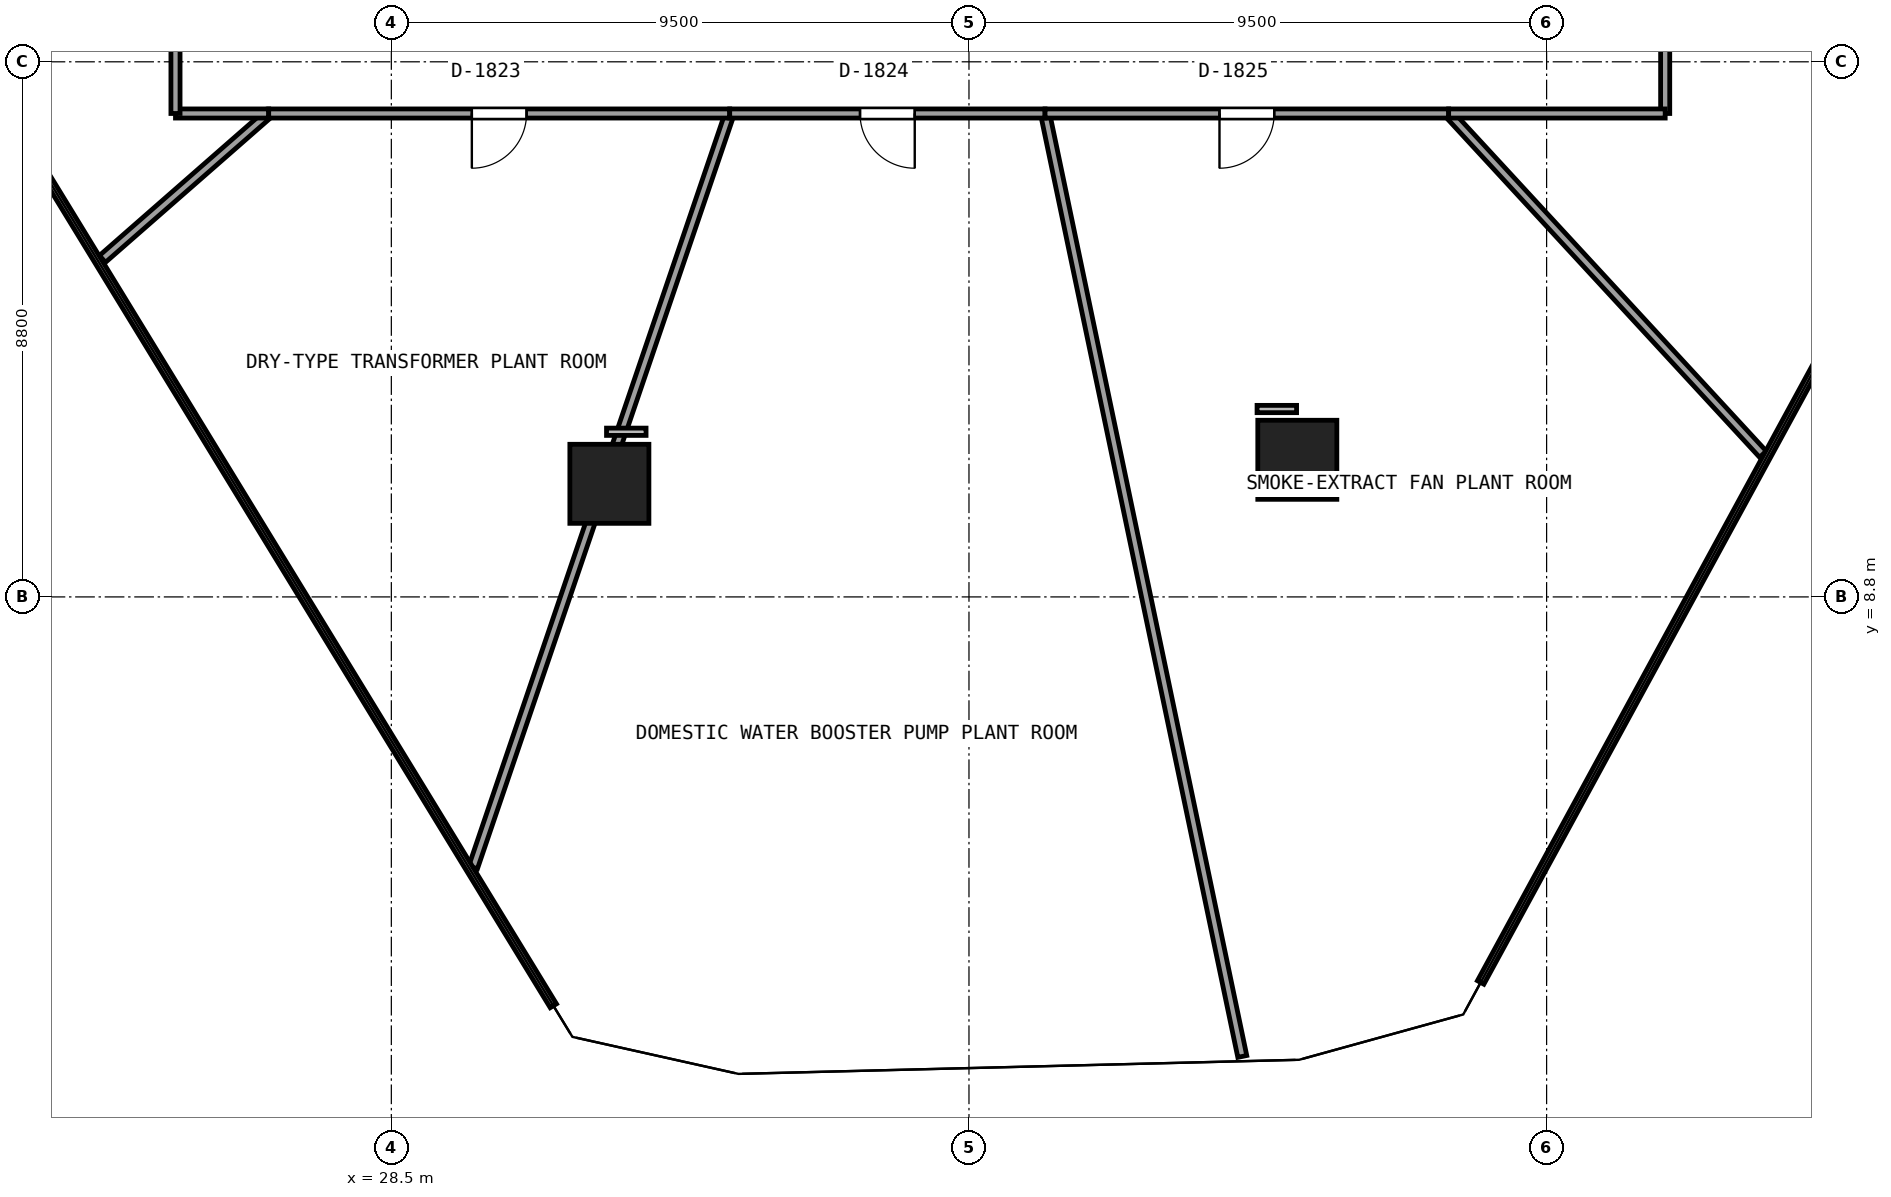
"""IFC4 building model, lengths in metres.
Left out: names, types, materials, properties, quantities, classifications, styles, units other than length and angle.
Written with IfcOpenShell. Run it as: python <this file> out.ifc"""

import sys

from ifc_helpers import new_model, si_unit, direction, frame, frame_2d, origin, origin_2d, place, context, subcontext, project, spatial, rectangle, extrude, element, fill, save


model = new_model("IFC4")
c1 = context("Model", 3, precision=1e-05, world=origin(), true_north=direction((0.0, 1.0)))
c2 = subcontext(c1, "Body", "Model", "MODEL_VIEW")
j1 = project(units=[si_unit("LENGTHUNIT", "METRE"), si_unit("PLANEANGLEUNIT", "RADIAN")], contexts=[c1])
p1 = place(None, origin())
s1 = spatial("IfcSite", under=j1, at=p1, CompositionType="ELEMENT")
p2 = place(p1, origin())
s2 = spatial("IfcBuilding", under=s1, at=p2, CompositionType="ELEMENT")
p3 = place(p2, frame((0.0, 0.0, 71.85)))
s3 = spatial("IfcBuildingStorey", under=s2, at=p3, CompositionType="ELEMENT", Elevation=71.85)
for number, where, z_axis, x_axis in (
    (1, (32.086, 10.66, 0.0), (0.0, 0.0, 1.0), (1.0, 0.0, 0.0)),
    (2, (43.4, 11.055, 0.0), (0.0, 0.0, 1.0), (1.0, 0.0, 0.0)),
):
    element("IfcColumn", number, at=place(p3, frame(where, z_axis=z_axis, x_axis=x_axis)), inside=s3, PredefinedType="COLUMN", context=c2, shape_type="SweptSolid", body=[
        extrude(rectangle(XDim=1.3, YDim=1.3, at=origin_2d()), origin(), (0.0, 0.0, 1.0), 4.08),
    ])
p4 = place(p3, frame((23.749, 14.358, 0.0), z_axis=(0.0, 0.0, 1.0), x_axis=(0.752585021189, 0.658495091767, 0.0)))
e3 = element("IfcWall", 3, at=p4, inside=s3, PredefinedType="PARTITIONING", context=c2, shape_type="SweptSolid", body=[
    extrude(rectangle(XDim=3.633, YDim=0.15, at=frame_2d((1.816, 0.0))), origin(), (0.0, 0.0, 1.0), 3.265),
])
p5 = place(p3, frame((26.483, 16.75, 0.0), z_axis=(0.0, 0.0, 1.0), x_axis=(-1.0, 0.0, 0.0)))
e4 = element("IfcWall", 4, at=p5, inside=s3, PredefinedType="PARTITIONING", context=c2, shape_type="SweptSolid", body=[
    extrude(rectangle(XDim=1.533, YDim=0.15, at=frame_2d((0.767, 0.0))), origin(), (0.0, 0.0, 1.0), 3.265),
])
p6 = place(p3, frame((24.95, 16.75, 0.0), z_axis=(0.0, 0.0, 1.0), x_axis=(0.0, 1.0, 0.0)))
e5 = element("IfcWall", 5, at=p6, inside=s3, PredefinedType="PARTITIONING", context=c2, shape_type="SweptSolid", body=[
    extrude(rectangle(XDim=1.85, YDim=0.15, at=frame_2d((0.925, 0.0))), origin(), (0.0, 0.0, 1.0), 3.265),
])
p7 = place(p3, frame((29.845, 4.353, 0.0), z_axis=(0.0, 0.0, 1.0), x_axis=(0.322244958059, 0.946656319371, 0.0)))
e6 = element("IfcWall", 6, at=p7, inside=s3, PredefinedType="PARTITIONING", context=c2, shape_type="SweptSolid", body=[
    extrude(rectangle(XDim=13.095, YDim=0.15, at=frame_2d((6.548, 0.0))), origin(), (0.0, 0.0, 1.0), 3.065),
])
p8 = place(p3, frame((34.065, 16.75, 0.0), z_axis=(0.0, 0.0, 1.0), x_axis=(-1.0, 0.0, 0.0)))
e7 = element("IfcWall", 7, at=p8, inside=s3, PredefinedType="PARTITIONING", context=c2, shape_type="SweptSolid", body=[
    extrude(rectangle(XDim=7.582, YDim=0.15, at=frame_2d((3.791, 0.0))), origin(), (0.0, 0.0, 1.0), 3.065),
])
p9 = place(p8, frame((3.341, 0.0, 0.0)))
e8 = element("IfcOpeningElement", 8, at=p9, cuts=e7, PredefinedType="OPENING", context=c2, shape_type="SweptSolid", body=[
    extrude(rectangle(XDim=0.9, YDim=2.0, at=frame_2d((0.45, 1.0))), frame((0.0, 0.085, 0.0), z_axis=(0.0, -1.0, 0.0), x_axis=(1.0, 0.0, 0.0)), (0.0, 0.0, 1.0), 0.17),
])
p10 = place(p3, frame((42.495, 1.243, 0.0), z_axis=(0.0, 0.0, 1.0), x_axis=(-0.204770795784, 0.97880995152, 0.0)))
e9 = element("IfcWall", 9, at=p10, inside=s3, PredefinedType="PARTITIONING", context=c2, shape_type="SweptSolid", body=[
    extrude(rectangle(XDim=15.843, YDim=0.15, at=frame_2d((7.921, 0.0))), origin(), (0.0, 0.0, 1.0), 3.265),
])
p11 = place(p3, frame((39.251, 16.75, 0.0), z_axis=(0.0, 0.0, 1.0), x_axis=(-1.0, 0.0, 0.0)))
e10 = element("IfcWall", 10, at=p11, inside=s3, PredefinedType="PARTITIONING", context=c2, shape_type="SweptSolid", body=[
    extrude(rectangle(XDim=5.186, YDim=0.15, at=frame_2d((2.593, 0.0))), origin(), (0.0, 0.0, 1.0), 3.065),
])
p12 = place(p11, frame((2.143, 0.0, 0.0)))
e11 = element("IfcOpeningElement", 11, at=p12, cuts=e10, PredefinedType="OPENING", context=c2, shape_type="SweptSolid", body=[
    extrude(rectangle(XDim=0.9, YDim=2.0, at=frame_2d((0.45, 1.0))), frame((0.0, 0.085, 0.0), z_axis=(0.0, -1.0, 0.0), x_axis=(1.0, 0.0, 0.0)), (0.0, 0.0, 1.0), 0.17),
])
p13 = place(p3, frame((51.058, 11.147, 0.0), z_axis=(0.0, 0.0, 1.0), x_axis=(-0.678079226392, 0.734988818103, 0.0)))
e12 = element("IfcWall", 12, at=p13, inside=s3, PredefinedType="PARTITIONING", context=c2, shape_type="SweptSolid", body=[
    extrude(rectangle(XDim=7.623, YDim=0.15, at=frame_2d((3.812, 0.0))), origin(), (0.0, 0.0, 1.0), 3.265),
])
p14 = place(p3, frame((45.889, 16.75, 0.0), z_axis=(0.0, 0.0, 1.0), x_axis=(-1.0, 0.0, 0.0)))
e13 = element("IfcWall", 13, at=p14, inside=s3, PredefinedType="PARTITIONING", context=c2, shape_type="SweptSolid", body=[
    extrude(rectangle(XDim=6.638, YDim=0.15, at=frame_2d((3.319, 0.0))), origin(), (0.0, 0.0, 1.0), 3.065),
])
p15 = place(p14, frame((2.869, 0.0, 0.0)))
e14 = element("IfcOpeningElement", 14, at=p15, cuts=e13, PredefinedType="OPENING", context=c2, shape_type="SweptSolid", body=[
    extrude(rectangle(XDim=0.9, YDim=2.0, at=frame_2d((0.45, 1.0))), frame((0.0, 0.085, 0.0), z_axis=(0.0, -1.0, 0.0), x_axis=(1.0, 0.0, 0.0)), (0.0, 0.0, 1.0), 0.17),
])
p16 = place(p3, frame((49.45, 18.6, 0.0), z_axis=(0.0, 0.0, 1.0), x_axis=(0.0, -1.0, 0.0)))
e15 = element("IfcWall", 15, at=p16, inside=s3, PredefinedType="PARTITIONING", context=c2, shape_type="SweptSolid", body=[
    extrude(rectangle(XDim=1.85, YDim=0.15, at=frame_2d((0.925, 0.0))), origin(), (0.0, 0.0, 1.0), 3.265),
])
p17 = place(p3, frame((49.45, 16.75, 0.0), z_axis=(0.0, 0.0, 1.0), x_axis=(-1.0, 0.0, 0.0)))
e16 = element("IfcWall", 16, at=p17, inside=s3, PredefinedType="PARTITIONING", context=c2, shape_type="SweptSolid", body=[
    extrude(rectangle(XDim=3.561, YDim=0.15, at=frame_2d((1.781, 0.0))), origin(), (0.0, 0.0, 1.0), 3.265),
])
p18 = place(p9, origin())
e17 = element("IfcDoor", 17, at=p18, inside=s3, OperationType="SINGLE_SWING_RIGHT", PredefinedType="DOOR", context=c2, shape_type="SweptSolid", body=[
    extrude(rectangle(XDim=0.9, YDim=2.0, at=frame_2d((0.45, 1.0))), frame((0.0, 0.025, 0.0), z_axis=(0.0, -1.0, 0.0), x_axis=(1.0, 0.0, 0.0)), (0.0, 0.0, 1.0), 0.05),
])
fill(e8, e17)
p19 = place(p12, origin())
e18 = element("IfcDoor", 18, at=p19, inside=s3, OperationType="SINGLE_SWING_LEFT", PredefinedType="DOOR", context=c2, shape_type="SweptSolid", body=[
    extrude(rectangle(XDim=0.9, YDim=2.0, at=frame_2d((0.45, 1.0))), frame((0.0, 0.025, 0.0), z_axis=(0.0, -1.0, 0.0), x_axis=(1.0, 0.0, 0.0)), (0.0, 0.0, 1.0), 0.05),
])
fill(e11, e18)
p20 = place(p15, origin())
e19 = element("IfcDoor", 19, at=p20, inside=s3, OperationType="SINGLE_SWING_RIGHT", PredefinedType="DOOR", context=c2, shape_type="SweptSolid", body=[
    extrude(rectangle(XDim=0.9, YDim=2.0, at=frame_2d((0.45, 1.0))), frame((0.0, 0.025, 0.0), z_axis=(0.0, -1.0, 0.0), x_axis=(1.0, 0.0, 0.0)), (0.0, 0.0, 1.0), 0.05),
])
fill(e14, e19)
save(model, sys.argv[1])
